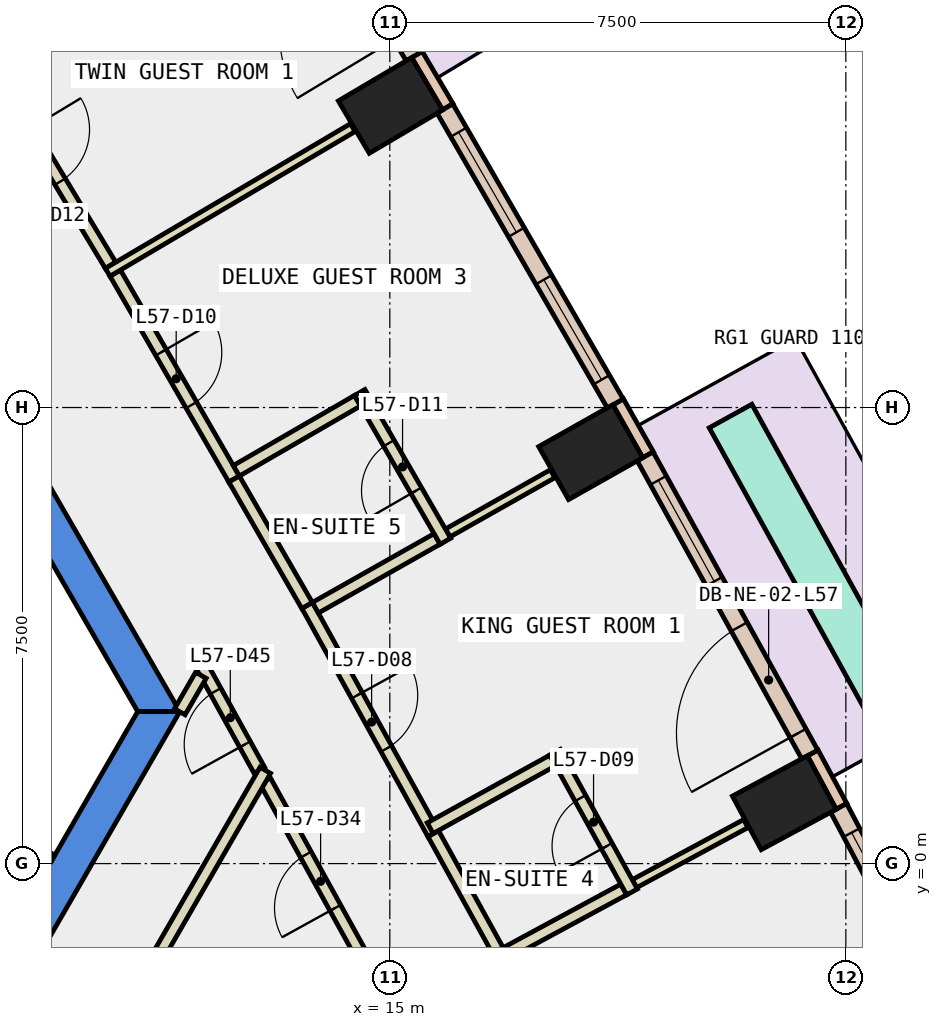
"""IFC4 building model, lengths in metres.
Left out: names, types, materials, properties, quantities, classifications, styles, units other than length and angle.
Written with IfcOpenShell. Run it as: python <this file> out.ifc"""

import sys

from ifc_helpers import new_model, si_unit, direction, frame, frame_2d, origin, origin_2d, place, context, subcontext, project, spatial, polyline, rectangle, outline, extrude, element, fill, save


model = new_model("IFC4")
c1 = context("Model", 3, precision=1e-05, world=origin(), true_north=direction((0.0, 1.0)))
c2 = subcontext(c1, "Body", "Model", "MODEL_VIEW")
j1 = project(units=[si_unit("LENGTHUNIT", "METRE"), si_unit("PLANEANGLEUNIT", "RADIAN")], contexts=[c1])
p1 = place(None, origin())
s1 = spatial("IfcSite", under=j1, at=p1, CompositionType="ELEMENT")
p2 = place(p1, origin())
s2 = spatial("IfcBuilding", under=s1, at=p2, CompositionType="ELEMENT")
p3 = place(p2, frame((0.0, 0.0, 252.2)))
s3 = spatial("IfcBuildingStorey", under=s2, at=p3, CompositionType="ELEMENT", Elevation=252.2)
for number, where, z_axis, x_axis in (
    (1, (21.488, 1.001, -0.34), (0.0, 0.0, 1.0), (-0.474, 0.881, 0.0)),
    (2, (18.304, 6.766, -0.34), (0.0, 0.0, 1.0), (-0.491, 0.871, 0.0)),
    (3, (15.011, 12.468, -0.34), (0.0, 0.0, 1.0), (-0.509, 0.861, 0.0)),
):
    element("IfcColumn", number, at=place(p3, frame(where, z_axis=z_axis, x_axis=x_axis)), inside=s3, PredefinedType="COLUMN", context=c2, shape_type="SweptSolid", body=[
        extrude(rectangle(XDim=1.0, YDim=1.4, at=origin_2d()), origin(), (0.0, 0.0, 1.0), 3.6),
    ])
p4 = place(p3, frame((0.0, 0.0, -0.34)))
e4 = element("IfcWall", 4, at=p4, inside=s3, PredefinedType="SHEAR", context=c2, shape_type="SweptSolid", body=[
    extrude(outline(polyline([(6.786, 10.747), (6.266, 10.447), (10.854, 2.5), (11.547, 2.5), (6.786, 10.747)])), origin(), (0.0, 0.0, 1.0), 3.6),
])
p5 = place(p3, frame((0.0, 0.0, -0.34)))
e5 = element("IfcWall", 5, at=p5, inside=s3, PredefinedType="SHEAR", context=c2, shape_type="SweptSolid", body=[
    extrude(outline(polyline([(5.774, -7.5), (11.547, 2.5), (10.854, 2.5), (5.427, -6.9), (5.774, -7.5)])), origin(), (0.0, 0.0, 1.0), 3.6),
])
for number, where, z_axis, x_axis in (
    (6, (22.429, 0.94, 0.0), (0.0, 0.0, 1.0), (-0.474, 0.881, 0.0)),
    (7, (19.247, 6.723, 0.0), (0.0, 0.0, 1.0), (-0.492, 0.871, 0.0)),
):
    element("IfcWall", number, at=place(p3, frame(where, z_axis=z_axis, x_axis=x_axis)), inside=s3, PredefinedType="STANDARD", context=c2, shape_type="SweptSolid", body=[
        extrude(rectangle(XDim=1.0, YDim=0.2, at=frame_2d((0.5, 0.0))), origin(), (0.0, 0.0, 1.0), 3.26),
    ])
p6 = place(p3, frame((15.954, 12.445, 0.0), z_axis=(0.0, 0.0, 1.0), x_axis=(-0.508268432768, 0.861198699634, 0.0)))
e8 = element("IfcWall", 8, at=p6, inside=s3, PredefinedType="STANDARD", context=c2, shape_type="SweptSolid", body=[
    extrude(rectangle(XDim=1.0, YDim=0.2, at=frame_2d((0.5, 0.0))), origin(), (0.0, 0.0, 1.0), 3.26),
])
p7 = place(p3, frame((25.012, -4.07, 0.0), z_axis=(0.0, 0.0, 1.0), x_axis=(-0.466663589714, 0.884434900959, 0.0)))
e9 = element("IfcWall", 9, at=p7, inside=s3, PredefinedType="STANDARD", context=c2, shape_type="SweptSolid", body=[
    extrude(rectangle(XDim=5.638, YDim=0.3, at=frame_2d((2.819, 0.0))), origin(), (0.0, 0.0, 1.0), 3.26),
])
p8 = place(p7, frame((0.459, 0.0, 0.9)))
e10 = element("IfcOpeningElement", 10, at=p8, cuts=e9, PredefinedType="OPENING", context=c2, shape_type="SweptSolid", body=[
    extrude(rectangle(XDim=1.9, YDim=2.0, at=frame_2d((0.95, 1.0))), frame((0.0, 0.16, 0.0), z_axis=(0.0, -1.0, 0.0), x_axis=(1.0, 0.0, 0.0)), (0.0, 0.0, 1.0), 0.32),
])
p9 = place(p7, frame((3.278, 0.0, 0.9)))
e11 = element("IfcOpeningElement", 11, at=p9, cuts=e9, PredefinedType="OPENING", context=c2, shape_type="SweptSolid", body=[
    extrude(rectangle(XDim=1.9, YDim=2.0, at=frame_2d((0.95, 1.0))), frame((0.0, 0.16, 0.0), z_axis=(0.0, -1.0, 0.0), x_axis=(1.0, 0.0, 0.0)), (0.0, 0.0, 1.0), 0.32),
])
p10 = place(p3, frame((21.907, 1.794, 0.0), z_axis=(0.0, 0.0, 1.0), x_axis=(-0.483469062695, 0.875361448441, 0.0)))
e12 = element("IfcWall", 12, at=p10, inside=s3, PredefinedType="STANDARD", context=c2, shape_type="SweptSolid", body=[
    extrude(rectangle(XDim=5.601, YDim=0.3, at=frame_2d((2.801, 0.0))), origin(), (0.0, 0.0, 1.0), 3.26),
])
p11 = place(p10, frame((0.4, 0.0, 0.0)))
e13 = element("IfcOpeningElement", 13, at=p11, cuts=e12, PredefinedType="OPENING", context=c2, shape_type="SweptSolid", body=[
    extrude(rectangle(XDim=2.0, YDim=2.4, at=frame_2d((1.0, 1.2))), frame((0.0, 0.16, 0.0), z_axis=(0.0, -1.0, 0.0), x_axis=(1.0, 0.0, 0.0)), (0.0, 0.0, 1.0), 0.32),
])
p12 = place(p10, frame((3.251, 0.0, 0.9)))
e14 = element("IfcOpeningElement", 14, at=p12, cuts=e12, PredefinedType="OPENING", context=c2, shape_type="SweptSolid", body=[
    extrude(rectangle(XDim=1.9, YDim=2.0, at=frame_2d((0.95, 1.0))), frame((0.0, 0.16, 0.0), z_axis=(0.0, -1.0, 0.0), x_axis=(1.0, 0.0, 0.0)), (0.0, 0.0, 1.0), 0.32),
])
p13 = place(p3, frame((18.708, 7.566, 0.0), z_axis=(0.0, 0.0, 1.0), x_axis=(-0.500089564757, 0.865973687372, 0.0)))
e15 = element("IfcWall", 15, at=p13, inside=s3, PredefinedType="STANDARD", context=c2, shape_type="SweptSolid", body=[
    extrude(rectangle(XDim=5.603, YDim=0.3, at=frame_2d((2.802, 0.0))), origin(), (0.0, 0.0, 1.0), 3.26),
])
p14 = place(p13, frame((0.451, 0.0, 0.9)))
e16 = element("IfcOpeningElement", 16, at=p14, cuts=e15, PredefinedType="OPENING", context=c2, shape_type="SweptSolid", body=[
    extrude(rectangle(XDim=1.9, YDim=2.0, at=frame_2d((0.95, 1.0))), frame((0.0, 0.16, 0.0), z_axis=(0.0, -1.0, 0.0), x_axis=(1.0, 0.0, 0.0)), (0.0, 0.0, 1.0), 0.32),
])
p15 = place(p13, frame((3.252, 0.0, 0.9)))
e17 = element("IfcOpeningElement", 17, at=p15, cuts=e15, PredefinedType="OPENING", context=c2, shape_type="SweptSolid", body=[
    extrude(rectangle(XDim=1.9, YDim=2.0, at=frame_2d((0.95, 1.0))), frame((0.0, 0.16, 0.0), z_axis=(0.0, -1.0, 0.0), x_axis=(1.0, 0.0, 0.0)), (0.0, 0.0, 1.0), 0.32),
])
p16 = place(p3, frame((15.399, 13.277, 0.0), z_axis=(0.0, 0.0, 1.0), x_axis=(-0.516269519619, 0.856426169096, 0.0)))
e18 = element("IfcWall", 18, at=p16, inside=s3, PredefinedType="STANDARD", context=c2, shape_type="SweptSolid", body=[
    extrude(rectangle(XDim=5.603, YDim=0.3, at=frame_2d((2.802, 0.0))), origin(), (0.0, 0.0, 1.0), 3.26),
])
p17 = place(p16, frame((0.401, 0.0, 0.0)))
e19 = element("IfcOpeningElement", 19, at=p17, cuts=e18, PredefinedType="OPENING", context=c2, shape_type="SweptSolid", body=[
    extrude(rectangle(XDim=2.0, YDim=2.4, at=frame_2d((1.0, 1.2))), frame((0.0, 0.16, 0.0), z_axis=(0.0, -1.0, 0.0), x_axis=(1.0, 0.0, 0.0)), (0.0, 0.0, 1.0), 0.32),
])
p18 = place(p16, frame((3.253, 0.0, 0.9)))
e20 = element("IfcOpeningElement", 20, at=p18, cuts=e18, PredefinedType="OPENING", context=c2, shape_type="SweptSolid", body=[
    extrude(rectangle(XDim=1.9, YDim=2.0, at=frame_2d((0.95, 1.0))), frame((0.0, 0.16, 0.0), z_axis=(0.0, -1.0, 0.0), x_axis=(1.0, 0.0, 0.0)), (0.0, 0.0, 1.0), 0.32),
])
p19 = place(p3, frame((23.215, 2.63, 0.0), z_axis=(0.0, 0.0, 1.0), x_axis=(-0.483262482812, 0.87547551234, 0.0)))
e21 = element("IfcWall", 21, at=p19, inside=s3, PredefinedType="STANDARD", context=c2, shape_type="SweptSolid", body=[
    extrude(rectangle(XDim=5.403, YDim=0.8, at=frame_2d((2.702, 0.0))), origin(), (0.0, 0.0, 1.0), 0.8),
])
p20 = place(p3, frame((12.854, 1.535, 0.0), z_axis=(0.0, 0.0, 1.0), x_axis=(-0.483730980407, 0.875216738068, 0.0)))
e22 = element("IfcWall", 22, at=p20, inside=s3, PredefinedType="PARTITIONING", context=c2, shape_type="SweptSolid", body=[
    extrude(rectangle(XDim=1.974, YDim=0.2, at=frame_2d((0.987, 0.0))), origin(), (0.0, 0.0, 1.0), 3.26),
])
p21 = place(p20, frame((0.487, 0.0, 0.0)))
e23 = element("IfcOpeningElement", 23, at=p21, cuts=e22, PredefinedType="OPENING", context=c2, shape_type="SweptSolid", body=[
    extrude(rectangle(XDim=1.0, YDim=2.1, at=frame_2d((0.5, 1.05))), frame((0.0, 0.11, 0.0), z_axis=(0.0, -1.0, 0.0), x_axis=(1.0, 0.0, 0.0)), (0.0, 0.0, 1.0), 0.22),
])
p22 = place(p3, frame((11.893, 3.097, 0.0), z_axis=(0.0, 0.0, 1.0), x_axis=(-0.500911294014, -0.865498628265, 0.0)))
e24 = element("IfcWall", 24, at=p22, inside=s3, PredefinedType="PARTITIONING", context=c2, shape_type="SweptSolid", body=[
    extrude(rectangle(XDim=0.693, YDim=0.2, at=frame_2d((0.347, 0.0))), origin(), (0.0, 0.0, 1.0), 3.26),
])
p23 = place(p3, frame((14.773, -1.941, 0.0), z_axis=(0.0, 0.0, 1.0), x_axis=(-0.483431586589, 0.875382145744, 0.0)))
e25 = element("IfcWall", 25, at=p23, inside=s3, PredefinedType="PARTITIONING", context=c2, shape_type="SweptSolid", body=[
    extrude(rectangle(XDim=3.771, YDim=0.2, at=frame_2d((1.885, 0.0))), origin(), (0.0, 0.0, 1.0), 3.26),
])
p24 = place(p23, frame((1.385, 0.0, 0.0)))
e26 = element("IfcOpeningElement", 26, at=p24, cuts=e25, PredefinedType="OPENING", context=c2, shape_type="SweptSolid", body=[
    extrude(rectangle(XDim=1.0, YDim=2.1, at=frame_2d((0.5, 1.05))), frame((0.0, 0.11, 0.0), z_axis=(0.0, -1.0, 0.0), x_axis=(1.0, 0.0, 0.0)), (0.0, 0.0, 1.0), 0.22),
])
p25 = place(p3, frame((13.641, 4.246, 0.0), z_axis=(0.0, 0.0, 1.0), x_axis=(0.483405752983, -0.875396411909, 0.0)))
e27 = element("IfcWall", 27, at=p25, inside=s3, PredefinedType="PARTITIONING", context=c2, shape_type="SweptSolid", body=[
    extrude(rectangle(XDim=4.284, YDim=0.2, at=frame_2d((2.142, 0.0))), origin(), (0.0, 0.0, 1.0), 3.26),
])
p26 = place(p25, frame((1.692, 0.0, 0.0)))
e28 = element("IfcOpeningElement", 28, at=p26, cuts=e27, PredefinedType="OPENING", context=c2, shape_type="SweptSolid", body=[
    extrude(rectangle(XDim=1.0, YDim=2.1, at=frame_2d((0.5, 1.05))), frame((0.0, 0.11, 0.0), z_axis=(0.0, -1.0, 0.0), x_axis=(1.0, 0.0, 0.0)), (0.0, 0.0, 1.0), 0.22),
])
p27 = place(p3, frame((15.715, 0.491, 0.0), z_axis=(0.0, 0.0, 1.0), x_axis=(0.483421428323, -0.875387755591, 0.0)))
e29 = element("IfcWall", 29, at=p27, inside=s3, PredefinedType="PARTITIONING", context=c2, shape_type="SweptSolid", body=[
    extrude(rectangle(XDim=2.194, YDim=0.2, at=frame_2d((1.097, 0.0))), origin(), (0.0, 0.0, 1.0), 3.26),
])
p28 = place(p3, frame((10.484, 9.71, 0.0), z_axis=(0.0, 0.0, 1.0), x_axis=(0.500034145141, -0.866005689181, 0.0)))
e30 = element("IfcWall", 30, at=p28, inside=s3, PredefinedType="PARTITIONING", context=c2, shape_type="SweptSolid", body=[
    extrude(rectangle(XDim=3.91, YDim=0.2, at=frame_2d((1.955, 0.0))), origin(), (0.0, 0.0, 1.0), 3.26),
])
p29 = place(p28, frame((1.505, 0.0, 0.0)))
e31 = element("IfcOpeningElement", 31, at=p29, cuts=e30, PredefinedType="OPENING", context=c2, shape_type="SweptSolid", body=[
    extrude(rectangle(XDim=1.0, YDim=2.1, at=frame_2d((0.5, 1.05))), frame((0.0, 0.11, 0.0), z_axis=(0.0, -1.0, 0.0), x_axis=(1.0, 0.0, 0.0)), (0.0, 0.0, 1.0), 0.22),
])
p30 = place(p3, frame((12.439, 6.324, 0.0), z_axis=(0.0, 0.0, 1.0), x_axis=(0.499913221443, -0.866075499611, 0.0)))
e32 = element("IfcWall", 32, at=p30, inside=s3, PredefinedType="PARTITIONING", context=c2, shape_type="SweptSolid", body=[
    extrude(rectangle(XDim=2.4, YDim=0.2, at=frame_2d((1.2, 0.0))), origin(), (0.0, 0.0, 1.0), 3.26),
])
p31 = place(p3, frame((8.181, 13.532, 0.0), z_axis=(0.0, 0.0, 1.0), x_axis=(0.51625987265, -0.856431984393, 0.0)))
e33 = element("IfcWall", 33, at=p31, inside=s3, PredefinedType="PARTITIONING", context=c2, shape_type="SweptSolid", body=[
    extrude(rectangle(XDim=4.312, YDim=0.2, at=frame_2d((2.156, 0.0))), origin(), (0.0, 0.0, 1.0), 3.26),
])
p32 = place(p31, frame((1.706, 0.0, 0.0)))
e34 = element("IfcOpeningElement", 34, at=p32, cuts=e33, PredefinedType="OPENING", context=c2, shape_type="SweptSolid", body=[
    extrude(rectangle(XDim=1.0, YDim=2.1, at=frame_2d((0.5, 1.05))), frame((0.0, 0.11, 0.0), z_axis=(0.0, -1.0, 0.0), x_axis=(1.0, 0.0, 0.0)), (0.0, 0.0, 1.0), 0.22),
])
p33 = place(p3, frame((8.141, 0.801, 0.0), z_axis=(0.0, 0.0, 1.0), x_axis=(0.866434738017, -0.499290341141, 0.0)))
e35 = element("IfcWall", 35, at=p33, inside=s3, PredefinedType="PARTITIONING", context=c2, shape_type="SweptSolid", body=[
    extrude(rectangle(XDim=1.5, YDim=0.2, at=frame_2d((0.75, 0.0))), origin(), (0.0, 0.0, 1.0), 3.26),
])
p34 = place(p3, frame((9.285, -4.818, 0.0), z_axis=(0.0, 0.0, 1.0), x_axis=(0.499962569651, 0.866047013128, 0.0)))
e36 = element("IfcWall", 36, at=p34, inside=s3, PredefinedType="PARTITIONING", context=c2, shape_type="SweptSolid", body=[
    extrude(rectangle(XDim=7.334, YDim=0.2, at=frame_2d((3.667, 0.0))), origin(), (0.0, 0.0, 1.0), 3.26),
])
p35 = place(p3, frame((19.023, -0.33, 0.0), z_axis=(0.0, 0.0, 1.0), x_axis=(0.880158309515, 0.474680261009, 0.0)))
e37 = element("IfcWall", 37, at=p35, inside=s3, PredefinedType="PARTITIONING", context=c2, shape_type="SweptSolid", body=[
    extrude(rectangle(XDim=2.082, YDim=0.15, at=frame_2d((1.041, 0.0))), origin(), (0.0, 0.0, 1.0), 3.26),
])
p36 = place(p3, frame((16.824, -1.518, 0.0), z_axis=(0.0, 0.0, 1.0), x_axis=(0.87996932648, 0.475030508972, 0.0)))
e38 = element("IfcWall", 38, at=p36, inside=s3, PredefinedType="PARTITIONING", context=c2, shape_type="SweptSolid", body=[
    extrude(rectangle(XDim=2.299, YDim=0.2, at=frame_2d((1.149, 0.0))), origin(), (0.0, 0.0, 1.0), 3.26),
])
p37 = place(p3, frame((18.984, -0.466, 0.0), z_axis=(0.0, 0.0, 1.0), x_axis=(-0.482922337539, 0.875663186337, 0.0)))
e39 = element("IfcWall", 39, at=p37, inside=s3, PredefinedType="PARTITIONING", context=c2, shape_type="SweptSolid", body=[
    extrude(rectangle(XDim=2.623, YDim=0.2, at=frame_2d((1.312, 0.0))), origin(), (0.0, 0.0, 1.0), 3.26),
])
p38 = place(p37, frame((0.861, 0.0, 0.0)))
e40 = element("IfcOpeningElement", 40, at=p38, cuts=e39, PredefinedType="OPENING", context=c2, shape_type="SweptSolid", body=[
    extrude(rectangle(XDim=0.9, YDim=2.1, at=frame_2d((0.45, 1.05))), frame((0.0, 0.11, 0.0), z_axis=(0.0, -1.0, 0.0), x_axis=(1.0, 0.0, 0.0)), (0.0, 0.0, 1.0), 0.22),
])
p39 = place(p3, frame((17.677, 1.695, 0.0), z_axis=(0.0, 0.0, 1.0), x_axis=(-0.875306576455, -0.483568399727, 0.0)))
e41 = element("IfcWall", 41, at=p39, inside=s3, PredefinedType="PARTITIONING", context=c2, shape_type="SweptSolid", body=[
    extrude(rectangle(XDim=2.3, YDim=0.2, at=frame_2d((1.15, 0.0))), origin(), (0.0, 0.0, 1.0), 3.26),
])
p40 = place(p3, frame((15.952, 5.437, 0.0), z_axis=(0.0, 0.0, 1.0), x_axis=(0.870817501488, 0.491606427036, 0.0)))
e42 = element("IfcWall", 42, at=p40, inside=s3, PredefinedType="PARTITIONING", context=c2, shape_type="SweptSolid", body=[
    extrude(rectangle(XDim=1.981, YDim=0.15, at=frame_2d((0.99, 0.0))), origin(), (0.0, 0.0, 1.0), 3.26),
])
p41 = place(p3, frame((13.776, 4.208, 0.0), z_axis=(0.0, 0.0, 1.0), x_axis=(0.870669592898, 0.491868336044, 0.0)))
e43 = element("IfcWall", 43, at=p41, inside=s3, PredefinedType="PARTITIONING", context=c2, shape_type="SweptSolid", body=[
    extrude(rectangle(XDim=2.3, YDim=0.2, at=frame_2d((1.15, 0.0))), origin(), (0.0, 0.0, 1.0), 3.26),
])
p42 = place(p3, frame((15.915, 5.301, 0.0), z_axis=(0.0, 0.0, 1.0), x_axis=(-0.499709979351, 0.866192782547, 0.0)))
e44 = element("IfcWall", 44, at=p42, inside=s3, PredefinedType="PARTITIONING", context=c2, shape_type="SweptSolid", body=[
    extrude(rectangle(XDim=2.824, YDim=0.2, at=frame_2d((1.412, 0.0))), origin(), (0.0, 0.0, 1.0), 3.26),
])
p43 = place(p42, frame((0.962, 0.0, 0.0)))
e45 = element("IfcOpeningElement", 45, at=p43, cuts=e44, PredefinedType="OPENING", context=c2, shape_type="SweptSolid", body=[
    extrude(rectangle(XDim=0.9, YDim=2.1, at=frame_2d((0.45, 1.05))), frame((0.0, 0.11, 0.0), z_axis=(0.0, -1.0, 0.0), x_axis=(1.0, 0.0, 0.0)), (0.0, 0.0, 1.0), 0.22),
])
p44 = place(p3, frame((14.467, 7.611, 0.0), z_axis=(0.0, 0.0, 1.0), x_axis=(-0.865716862402, -0.500534028967, 0.0)))
e46 = element("IfcWall", 46, at=p44, inside=s3, PredefinedType="PARTITIONING", context=c2, shape_type="SweptSolid", body=[
    extrude(rectangle(XDim=2.3, YDim=0.2, at=frame_2d((1.15, 0.0))), origin(), (0.0, 0.0, 1.0), 3.26),
])
p45 = place(p3, frame((10.36, 9.724, 0.0), z_axis=(0.0, 0.0, 1.0), x_axis=(0.861211954005, 0.508245974188, 0.0)))
e47 = element("IfcWall", 47, at=p45, inside=s3, PredefinedType="PARTITIONING", context=c2, shape_type="SweptSolid", body=[
    extrude(rectangle(XDim=4.681, YDim=0.15, at=frame_2d((2.34, 0.0))), origin(), (0.0, 0.0, 1.0), 3.26),
])
p46 = place(p9, origin())
e48 = element("IfcWindow", 48, at=p46, inside=s3, PartitioningType="SINGLE_PANEL", PredefinedType="WINDOW", context=c2, shape_type="SweptSolid", body=[
    extrude(rectangle(XDim=1.9, YDim=2.0, at=frame_2d((0.95, 1.0))), frame((0.0, 0.03, 0.0), z_axis=(0.0, -1.0, 0.0), x_axis=(1.0, 0.0, 0.0)), (0.0, 0.0, 1.0), 0.06),
])
fill(e11, e48)
p47 = place(p11, origin())
e49 = element("IfcDoor", 49, at=p47, inside=s3, OperationType="SLIDING_TO_LEFT", PredefinedType="DOOR", context=c2, shape_type="SweptSolid", body=[
    extrude(rectangle(XDim=2.0, YDim=2.4, at=frame_2d((1.0, 1.2))), frame((0.0, 0.025, 0.0), z_axis=(0.0, -1.0, 0.0), x_axis=(1.0, 0.0, 0.0)), (0.0, 0.0, 1.0), 0.05),
])
fill(e13, e49)
p48 = place(p12, origin())
e50 = element("IfcWindow", 50, at=p48, inside=s3, PartitioningType="SINGLE_PANEL", PredefinedType="WINDOW", context=c2, shape_type="SweptSolid", body=[
    extrude(rectangle(XDim=1.9, YDim=2.0, at=frame_2d((0.95, 1.0))), frame((0.0, 0.03, 0.0), z_axis=(0.0, -1.0, 0.0), x_axis=(1.0, 0.0, 0.0)), (0.0, 0.0, 1.0), 0.06),
])
fill(e14, e50)
p49 = place(p14, origin())
e51 = element("IfcWindow", 51, at=p49, inside=s3, PartitioningType="SINGLE_PANEL", PredefinedType="WINDOW", context=c2, shape_type="SweptSolid", body=[
    extrude(rectangle(XDim=1.9, YDim=2.0, at=frame_2d((0.95, 1.0))), frame((0.0, 0.03, 0.0), z_axis=(0.0, -1.0, 0.0), x_axis=(1.0, 0.0, 0.0)), (0.0, 0.0, 1.0), 0.06),
])
fill(e16, e51)
p50 = place(p15, origin())
e52 = element("IfcWindow", 52, at=p50, inside=s3, PartitioningType="SINGLE_PANEL", PredefinedType="WINDOW", context=c2, shape_type="SweptSolid", body=[
    extrude(rectangle(XDim=1.9, YDim=2.0, at=frame_2d((0.95, 1.0))), frame((0.0, 0.03, 0.0), z_axis=(0.0, -1.0, 0.0), x_axis=(1.0, 0.0, 0.0)), (0.0, 0.0, 1.0), 0.06),
])
fill(e17, e52)
p51 = place(p26, origin())
e53 = element("IfcDoor", 53, at=p51, inside=s3, OperationType="SINGLE_SWING_RIGHT", PredefinedType="DOOR", context=c2, shape_type="SweptSolid", body=[
    extrude(rectangle(XDim=1.0, YDim=2.1, at=frame_2d((0.5, 1.05))), frame((0.0, 0.025, 0.0), z_axis=(0.0, -1.0, 0.0), x_axis=(1.0, 0.0, 0.0)), (0.0, 0.0, 1.0), 0.05),
])
fill(e28, e53)
p52 = place(p38, origin())
e54 = element("IfcDoor", 54, at=p52, inside=s3, OperationType="SINGLE_SWING_LEFT", PredefinedType="DOOR", context=c2, shape_type="SweptSolid", body=[
    extrude(rectangle(XDim=0.9, YDim=2.1, at=frame_2d((0.45, 1.05))), frame((0.0, 0.025, 0.0), z_axis=(0.0, -1.0, 0.0), x_axis=(1.0, 0.0, 0.0)), (0.0, 0.0, 1.0), 0.05),
])
fill(e40, e54)
p53 = place(p29, origin())
e55 = element("IfcDoor", 55, at=p53, inside=s3, OperationType="SINGLE_SWING_LEFT", PredefinedType="DOOR", context=c2, shape_type="SweptSolid", body=[
    extrude(rectangle(XDim=1.0, YDim=2.1, at=frame_2d((0.5, 1.05))), frame((0.0, 0.025, 0.0), z_axis=(0.0, -1.0, 0.0), x_axis=(1.0, 0.0, 0.0)), (0.0, 0.0, 1.0), 0.05),
])
fill(e31, e55)
p54 = place(p43, origin())
e56 = element("IfcDoor", 56, at=p54, inside=s3, OperationType="SINGLE_SWING_LEFT", PredefinedType="DOOR", context=c2, shape_type="SweptSolid", body=[
    extrude(rectangle(XDim=0.9, YDim=2.1, at=frame_2d((0.45, 1.05))), frame((0.0, 0.025, 0.0), z_axis=(0.0, -1.0, 0.0), x_axis=(1.0, 0.0, 0.0)), (0.0, 0.0, 1.0), 0.05),
])
fill(e45, e56)
p55 = place(p32, origin())
e57 = element("IfcDoor", 57, at=p55, inside=s3, OperationType="SINGLE_SWING_LEFT", PredefinedType="DOOR", context=c2, shape_type="SweptSolid", body=[
    extrude(rectangle(XDim=1.0, YDim=2.1, at=frame_2d((0.5, 1.05))), frame((0.0, 0.025, 0.0), z_axis=(0.0, -1.0, 0.0), x_axis=(1.0, 0.0, 0.0)), (0.0, 0.0, 1.0), 0.05),
])
fill(e34, e57)
p56 = place(p24, origin())
e58 = element("IfcDoor", 58, at=p56, inside=s3, OperationType="SINGLE_SWING_LEFT", PredefinedType="DOOR", context=c2, shape_type="SweptSolid", body=[
    extrude(rectangle(XDim=1.0, YDim=2.1, at=frame_2d((0.5, 1.05))), frame((0.0, 0.025, 0.0), z_axis=(0.0, -1.0, 0.0), x_axis=(1.0, 0.0, 0.0)), (0.0, 0.0, 1.0), 0.05),
])
fill(e26, e58)
p57 = place(p21, origin())
e59 = element("IfcDoor", 59, at=p57, inside=s3, OperationType="SINGLE_SWING_LEFT", PredefinedType="DOOR", context=c2, shape_type="SweptSolid", body=[
    extrude(rectangle(XDim=1.0, YDim=2.1, at=frame_2d((0.5, 1.05))), frame((0.0, 0.025, 0.0), z_axis=(0.0, -1.0, 0.0), x_axis=(1.0, 0.0, 0.0)), (0.0, 0.0, 1.0), 0.05),
])
fill(e23, e59)
save(model, sys.argv[1])
